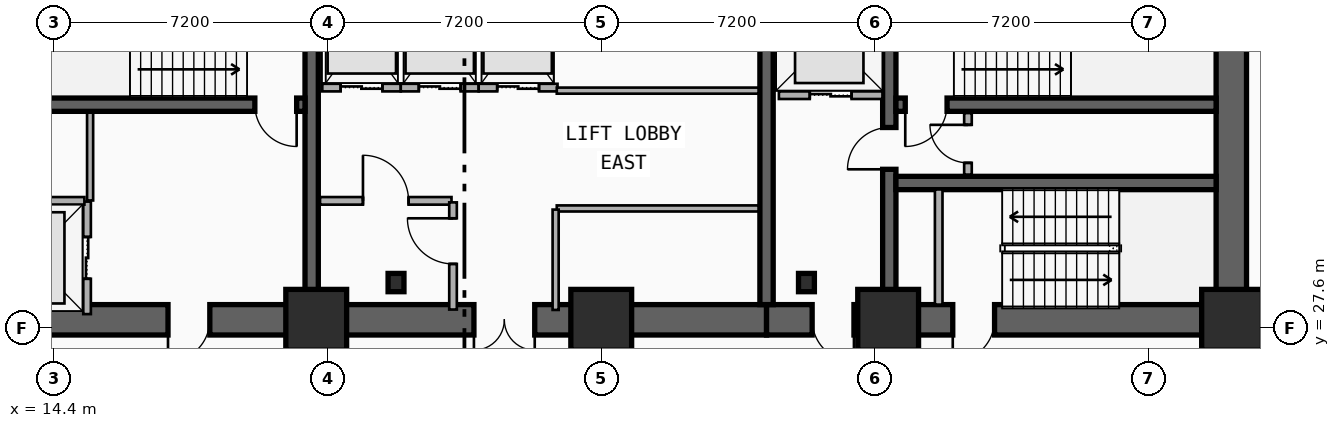
"""IFC4 building model, lengths in metres.
Left out: names, types, materials, properties, quantities, classifications, styles, units other than length and angle.
Written with IfcOpenShell. Run it as: python <this file> out.ifc"""

import sys

from ifc_helpers import new_model, si_unit, direction, frame, frame_2d, origin, origin_2d, place, context, subcontext, project, spatial, rectangle, i_section, extrude, element, fill, save


model = new_model("IFC4")
c1 = context("Model", 3, precision=1e-05, world=origin(), true_north=direction((0.0, 1.0)))
c2 = subcontext(c1, "Body", "Model", "MODEL_VIEW")
j1 = project(units=[si_unit("LENGTHUNIT", "METRE"), si_unit("PLANEANGLEUNIT", "RADIAN")], contexts=[c1])
p1 = place(None, origin())
s1 = spatial("IfcSite", under=j1, at=p1, CompositionType="ELEMENT")
p2 = place(p1, origin())
s2 = spatial("IfcBuilding", under=s1, at=p2, CompositionType="ELEMENT")
p3 = place(p2, frame((0.0, 0.0, -4.4)))
s3 = spatial("IfcBuildingStorey", under=s2, at=p3, CompositionType="ELEMENT", Elevation=-4.4)
p4 = place(p3, frame((21.18, 27.82, 0.0), z_axis=(0.0, 0.0, 1.0), x_axis=(-1.0, 0.0, 0.0)))
e1 = element("IfcWall", 1, at=p4, inside=s3, PredefinedType="SHEAR", context=c2, shape_type="SweptSolid", body=[
    extrude(rectangle(XDim=9.03, YDim=0.8, at=frame_2d((4.515, 0.0))), origin(), (0.0, 0.0, 1.0), 4.4),
])
p5 = place(p4, frame((2.68, 0.0, 0.0)))
e2 = element("IfcOpeningElement", 2, at=p5, cuts=e1, PredefinedType="OPENING", context=c2, shape_type="SweptSolid", body=[
    extrude(rectangle(XDim=1.1, YDim=2.15, at=frame_2d((0.55, 1.075))), frame((0.0, 0.41, 0.0), z_axis=(0.0, -1.0, 0.0), x_axis=(1.0, 0.0, 0.0)), (0.0, 0.0, 1.0), 0.82),
])
p6 = place(p3, frame((33.15, 27.82, 0.0), z_axis=(0.0, 0.0, 1.0), x_axis=(-1.0, 0.0, 0.0)))
e3 = element("IfcWall", 3, at=p6, inside=s3, PredefinedType="SHEAR", context=c2, shape_type="SweptSolid", body=[
    extrude(rectangle(XDim=11.97, YDim=0.8, at=frame_2d((5.985, 0.0))), origin(), (0.0, 0.0, 1.0), 4.4),
])
p7 = place(p6, frame((6.1, 0.0, 0.0)))
e4 = element("IfcOpeningElement", 4, at=p7, cuts=e3, PredefinedType="OPENING", context=c2, shape_type="SweptSolid", body=[
    extrude(rectangle(XDim=1.6, YDim=2.2, at=frame_2d((0.8, 1.1))), frame((0.0, 0.41, 0.0), z_axis=(0.0, -1.0, 0.0), x_axis=(1.0, 0.0, 0.0)), (0.0, 0.0, 1.0), 0.82),
])
p8 = place(p3, frame((45.38, 27.82, 0.0), z_axis=(0.0, 0.0, 1.0), x_axis=(-1.0, 0.0, 0.0)))
e5 = element("IfcWall", 5, at=p8, inside=s3, PredefinedType="SHEAR", context=c2, shape_type="SweptSolid", body=[
    extrude(rectangle(XDim=12.23, YDim=0.8, at=frame_2d((6.115, 0.0))), origin(), (0.0, 0.0, 1.0), 4.4),
])
p9 = place(p8, frame((9.93, 0.0, 0.0)))
e6 = element("IfcOpeningElement", 6, at=p9, cuts=e5, PredefinedType="OPENING", context=c2, shape_type="SweptSolid", body=[
    extrude(rectangle(XDim=1.1, YDim=2.15, at=frame_2d((0.55, 1.075))), frame((0.0, 0.41, 0.0), z_axis=(0.0, -1.0, 0.0), x_axis=(1.0, 0.0, 0.0)), (0.0, 0.0, 1.0), 0.82),
])
p10 = place(p8, frame((6.23, 0.0, 0.0)))
e7 = element("IfcOpeningElement", 7, at=p10, cuts=e5, PredefinedType="OPENING", context=c2, shape_type="SweptSolid", body=[
    extrude(rectangle(XDim=1.1, YDim=2.15, at=frame_2d((0.55, 1.075))), frame((0.0, 0.41, 0.0), z_axis=(0.0, -1.0, 0.0), x_axis=(1.0, 0.0, 0.0)), (0.0, 0.0, 1.0), 0.82),
])
p11 = place(p3, frame((45.38, 28.22, 0.0), z_axis=(0.0, 0.0, 1.0), x_axis=(0.0, 1.0, 0.0)))
e8 = element("IfcWall", 8, at=p11, inside=s3, PredefinedType="SHEAR", context=c2, shape_type="SweptSolid", body=[
    extrude(rectangle(XDim=8.43, YDim=0.8, at=frame_2d((4.215, 0.0))), origin(), (0.0, 0.0, 1.0), 4.4),
])
for number, where, z_axis, x_axis in (
    (9, (21.18, 28.22, 0.0), (0.0, 0.0, 1.0), (0.0, 1.0, 0.0)),
    (10, (33.15, 28.22, 0.0), (0.0, 0.0, 1.0), (0.0, 1.0, 0.0)),
):
    element("IfcWall", number, at=place(p3, frame(where, z_axis=z_axis, x_axis=x_axis)), inside=s3, PredefinedType="SHEAR", context=c2, shape_type="SweptSolid", body=[
        extrude(rectangle(XDim=8.43, YDim=0.35, at=frame_2d((4.215, 0.0))), origin(), (0.0, 0.0, 1.0), 4.4),
    ])
p12 = place(p3, frame((36.38, 28.22, 0.0), z_axis=(0.0, 0.0, 1.0), x_axis=(0.0, 1.0, 0.0)))
e11 = element("IfcWall", 11, at=p12, inside=s3, PredefinedType="SHEAR", context=c2, shape_type="SweptSolid", body=[
    extrude(rectangle(XDim=8.43, YDim=0.35, at=frame_2d((4.215, 0.0))), origin(), (0.0, 0.0, 1.0), 4.4),
])
p13 = place(p12, frame((3.56, 0.0, 0.0)))
e12 = element("IfcOpeningElement", 12, at=p13, cuts=e11, PredefinedType="OPENING", context=c2, shape_type="SweptSolid", body=[
    extrude(rectangle(XDim=1.1, YDim=2.15, at=frame_2d((0.55, 1.075))), frame((0.0, 0.185, 0.0), z_axis=(0.0, -1.0, 0.0), x_axis=(1.0, 0.0, 0.0)), (0.0, 0.0, 1.0), 0.37),
])
p14 = place(p3, frame((21.005, 33.48, 0.0), z_axis=(0.0, 0.0, 1.0), x_axis=(-1.0, 0.0, 0.0)))
e13 = element("IfcWall", 13, at=p14, inside=s3, PredefinedType="SHEAR", context=c2, shape_type="SweptSolid", body=[
    extrude(rectangle(XDim=8.455, YDim=0.35, at=frame_2d((4.228, 0.0))), origin(), (0.0, 0.0, 1.0), 4.4),
])
p15 = place(p14, frame((0.22, 0.0, 0.0)))
e14 = element("IfcOpeningElement", 14, at=p15, cuts=e13, PredefinedType="OPENING", context=c2, shape_type="SweptSolid", body=[
    extrude(rectangle(XDim=1.1, YDim=2.15, at=frame_2d((0.55, 1.075))), frame((0.0, 0.185, 0.0), z_axis=(0.0, -1.0, 0.0), x_axis=(1.0, 0.0, 0.0)), (0.0, 0.0, 1.0), 0.37),
])
p16 = place(p3, frame((44.98, 33.48, 0.0), z_axis=(0.0, 0.0, 1.0), x_axis=(-1.0, 0.0, 0.0)))
e15 = element("IfcWall", 15, at=p16, inside=s3, PredefinedType="SHEAR", context=c2, shape_type="SweptSolid", body=[
    extrude(rectangle(XDim=8.425, YDim=0.35, at=frame_2d((4.212, 0.0))), origin(), (0.0, 0.0, 1.0), 4.4),
])
p17 = place(p16, frame((7.08, 0.0, 0.0)))
e16 = element("IfcOpeningElement", 16, at=p17, cuts=e15, PredefinedType="OPENING", context=c2, shape_type="SweptSolid", body=[
    extrude(rectangle(XDim=1.1, YDim=2.15, at=frame_2d((0.55, 1.075))), frame((0.0, 0.185, 0.0), z_axis=(0.0, -1.0, 0.0), x_axis=(1.0, 0.0, 0.0)), (0.0, 0.0, 1.0), 0.37),
])
p18 = place(p3, frame((36.555, 31.42, 0.0), z_axis=(0.0, 0.0, 1.0), x_axis=(1.0, 0.0, 0.0)))
e17 = element("IfcWall", 17, at=p18, inside=s3, PredefinedType="SHEAR", context=c2, shape_type="SweptSolid", body=[
    extrude(rectangle(XDim=8.425, YDim=0.35, at=frame_2d((4.212, 0.0))), origin(), (0.0, 0.0, 1.0), 4.4),
])
for number, where, z_axis, x_axis in (
    (18, (23.4, 28.8, 0.0), (0.0, 0.0, 1.0), (1.0, 0.0, 0.0)),
    (19, (34.2, 28.8, 0.0), (0.0, 0.0, 1.0), (1.0, 0.0, 0.0)),
):
    element("IfcColumn", number, at=place(p3, frame(where, z_axis=z_axis, x_axis=x_axis)), inside=s3, PredefinedType="COLUMN", context=c2, shape_type="SweptSolid", body=[
        extrude(i_section(OverallWidth=0.418, OverallDepth=0.481, WebThickness=0.043, FlangeThickness=0.068, FilletRadius=0.015, at=origin_2d()), origin(), (0.0, 0.0, 1.0), 4.4),
    ])
for number, where, z_axis, x_axis in (
    (20, (21.3, 27.82, 0.0), (0.0, 0.0, 1.0), (1.0, 0.0, 0.0)),
    (21, (28.8, 27.82, 0.0), (0.0, 0.0, 1.0), (1.0, 0.0, 0.0)),
    (22, (36.35, 27.82, 0.0), (0.0, 0.0, 1.0), (1.0, 0.0, 0.0)),
    (23, (45.4, 27.82, 0.0), (0.0, 0.0, 1.0), (1.0, 0.0, 0.0)),
):
    element("IfcColumn", number, at=place(p3, frame(where, z_axis=z_axis, x_axis=x_axis)), inside=s3, PredefinedType="COLUMN", context=c2, shape_type="SweptSolid", body=[
        extrude(rectangle(XDim=1.6, YDim=1.6, at=origin_2d()), origin(), (0.0, 0.0, 1.0), 4.4),
    ])
p19 = place(p3, frame((15.27, 27.97, 0.0), z_axis=(0.0, 0.0, 1.0), x_axis=(0.0, 1.0, 0.0)))
e24 = element("IfcWall", 24, at=p19, inside=s3, PredefinedType="PARTITIONING", context=c2, shape_type="SweptSolid", body=[
    extrude(rectangle(XDim=2.96, YDim=0.2, at=frame_2d((1.48, 0.0))), origin(), (0.0, 0.0, 1.0), 3.022),
])
p20 = place(p19, frame((0.93, 0.0, 0.0)))
e25 = element("IfcOpeningElement", 25, at=p20, cuts=e24, PredefinedType="OPENING", context=c2, shape_type="SweptSolid", body=[
    extrude(rectangle(XDim=1.1, YDim=2.15, at=frame_2d((0.55, 1.075))), frame((0.0, 0.11, 0.0), z_axis=(0.0, -1.0, 0.0), x_axis=(1.0, 0.0, 0.0)), (0.0, 0.0, 1.0), 0.22),
])
p21 = place(p3, frame((12.45, 30.95, 0.0), z_axis=(0.0, 0.0, 1.0), x_axis=(1.0, 0.0, 0.0)))
e26 = element("IfcWall", 26, at=p21, inside=s3, PredefinedType="PARTITIONING", context=c2, shape_type="SweptSolid", body=[
    extrude(rectangle(XDim=2.75, YDim=0.2, at=frame_2d((1.375, 0.0))), origin(), (0.0, 0.0, 1.0), 3.022),
])
p22 = place(p3, frame((33.475, 33.73, 0.0), z_axis=(0.0, 0.0, 1.0), x_axis=(1.0, 0.0, 0.0)))
e27 = element("IfcWall", 27, at=p22, inside=s3, PredefinedType="PARTITIONING", context=c2, shape_type="SweptSolid", body=[
    extrude(rectangle(XDim=2.725, YDim=0.2, at=frame_2d((1.362, 0.0))), origin(), (0.0, 0.0, 1.0), 3.022),
])
p23 = place(p22, frame((0.812, 0.0, 0.0)))
e28 = element("IfcOpeningElement", 28, at=p23, cuts=e27, PredefinedType="OPENING", context=c2, shape_type="SweptSolid", body=[
    extrude(rectangle(XDim=1.1, YDim=2.15, at=frame_2d((0.55, 1.075))), frame((0.0, 0.11, 0.0), z_axis=(0.0, -1.0, 0.0), x_axis=(1.0, 0.0, 0.0)), (0.0, 0.0, 1.0), 0.22),
])
p24 = place(p3, frame((21.46, 33.93, 0.0), z_axis=(0.0, 0.0, 1.0), x_axis=(1.0, 0.0, 0.0)))
e29 = element("IfcWall", 29, at=p24, inside=s3, PredefinedType="PARTITIONING", context=c2, shape_type="SweptSolid", body=[
    extrude(rectangle(XDim=2.065, YDim=0.2, at=frame_2d((1.032, 0.0))), origin(), (0.0, 0.0, 1.0), 3.022),
])
p25 = place(p24, frame((0.482, 0.0, 0.0)))
e30 = element("IfcOpeningElement", 30, at=p25, cuts=e29, PredefinedType="OPENING", context=c2, shape_type="SweptSolid", body=[
    extrude(rectangle(XDim=1.1, YDim=2.15, at=frame_2d((0.55, 1.075))), frame((0.0, 0.11, 0.0), z_axis=(0.0, -1.0, 0.0), x_axis=(1.0, 0.0, 0.0)), (0.0, 0.0, 1.0), 0.22),
])
p26 = place(p3, frame((23.525, 33.93, 0.0), z_axis=(0.0, 0.0, 1.0), x_axis=(1.0, 0.0, 0.0)))
e31 = element("IfcWall", 31, at=p26, inside=s3, PredefinedType="PARTITIONING", context=c2, shape_type="SweptSolid", body=[
    extrude(rectangle(XDim=2.05, YDim=0.2, at=frame_2d((1.025, 0.0))), origin(), (0.0, 0.0, 1.0), 4.05),
])
p27 = place(p26, frame((0.475, 0.0, 0.0)))
e32 = element("IfcOpeningElement", 32, at=p27, cuts=e31, PredefinedType="OPENING", context=c2, shape_type="SweptSolid", body=[
    extrude(rectangle(XDim=1.1, YDim=2.15, at=frame_2d((0.55, 1.075))), frame((0.0, 0.11, 0.0), z_axis=(0.0, -1.0, 0.0), x_axis=(1.0, 0.0, 0.0)), (0.0, 0.0, 1.0), 0.22),
])
p28 = place(p3, frame((25.575, 33.93, 0.0), z_axis=(0.0, 0.0, 1.0), x_axis=(1.0, 0.0, 0.0)))
e33 = element("IfcWall", 33, at=p28, inside=s3, PredefinedType="PARTITIONING", context=c2, shape_type="SweptSolid", body=[
    extrude(rectangle(XDim=2.075, YDim=0.2, at=frame_2d((1.038, 0.0))), origin(), (0.0, 0.0, 1.0), 4.05),
])
p29 = place(p28, frame((0.488, 0.0, 0.0)))
e34 = element("IfcOpeningElement", 34, at=p29, cuts=e33, PredefinedType="OPENING", context=c2, shape_type="SweptSolid", body=[
    extrude(rectangle(XDim=1.1, YDim=2.15, at=frame_2d((0.55, 1.075))), frame((0.0, 0.11, 0.0), z_axis=(0.0, -1.0, 0.0), x_axis=(1.0, 0.0, 0.0)), (0.0, 0.0, 1.0), 0.22),
])
p30 = place(p3, frame((37.68, 28.22, 0.0), z_axis=(0.0, 0.0, 1.0), x_axis=(0.0, 1.0, 0.0)))
e35 = element("IfcWall", 35, at=p30, inside=s3, PredefinedType="PARTITIONING", context=c2, shape_type="SweptSolid", body=[
    extrude(rectangle(XDim=3.03, YDim=0.2, at=frame_2d((1.515, 0.0))), origin(), (0.0, 0.0, 1.0), 4.05),
])
p31 = place(p3, frame((38.45, 31.64, 0.0), z_axis=(0.0, 0.0, 1.0), x_axis=(0.0, 1.0, 0.0)))
e36 = element("IfcWall", 36, at=p31, inside=s3, PredefinedType="PARTITIONING", context=c2, shape_type="SweptSolid", body=[
    extrude(rectangle(XDim=1.62, YDim=0.2, at=frame_2d((0.81, 0.0))), origin(), (0.0, 0.0, 1.0), 4.05),
])
p32 = place(p31, frame((0.31, 0.0, 0.0)))
e37 = element("IfcOpeningElement", 37, at=p32, cuts=e36, PredefinedType="OPENING", context=c2, shape_type="SweptSolid", body=[
    extrude(rectangle(XDim=1.0, YDim=2.15, at=frame_2d((0.5, 1.075))), frame((0.0, 0.11, 0.0), z_axis=(0.0, -1.0, 0.0), x_axis=(1.0, 0.0, 0.0)), (0.0, 0.0, 1.0), 0.22),
])
p33 = place(p3, frame((21.4, 30.95, 0.0), z_axis=(0.0, 0.0, 1.0), x_axis=(1.0, 0.0, 0.0)))
e38 = element("IfcWall", 38, at=p33, inside=s3, PredefinedType="PARTITIONING", context=c2, shape_type="SweptSolid", body=[
    extrude(rectangle(XDim=3.46, YDim=0.2, at=frame_2d((1.73, 0.0))), origin(), (0.0, 0.0, 1.0), 3.022),
])
p34 = place(p33, frame((1.13, 0.0, 0.0)))
e39 = element("IfcOpeningElement", 39, at=p34, cuts=e38, PredefinedType="OPENING", context=c2, shape_type="SweptSolid", body=[
    extrude(rectangle(XDim=1.2, YDim=2.15, at=frame_2d((0.6, 1.075))), frame((0.0, 0.11, 0.0), z_axis=(0.0, -1.0, 0.0), x_axis=(1.0, 0.0, 0.0)), (0.0, 0.0, 1.0), 0.22),
])
p35 = place(p3, frame((24.9, 28.09, 0.0), z_axis=(0.0, 0.0, 1.0), x_axis=(0.0, 1.0, 0.0)))
e40 = element("IfcWall", 40, at=p35, inside=s3, PredefinedType="PARTITIONING", context=c2, shape_type="SweptSolid", body=[
    extrude(rectangle(XDim=2.82, YDim=0.2, at=frame_2d((1.41, 0.0))), origin(), (0.0, 0.0, 1.0), 4.05),
])
p36 = place(p35, frame((1.201, 0.0, 0.0)))
e41 = element("IfcOpeningElement", 41, at=p36, cuts=e40, PredefinedType="OPENING", context=c2, shape_type="SweptSolid", body=[
    extrude(rectangle(XDim=1.2, YDim=2.15, at=frame_2d((0.6, 1.075))), frame((0.0, 0.11, 0.0), z_axis=(0.0, -1.0, 0.0), x_axis=(1.0, 0.0, 0.0)), (0.0, 0.0, 1.0), 0.22),
])
p37 = place(p3, frame((15.35, 30.96, 0.0), z_axis=(0.0, 0.0, 1.0), x_axis=(0.0, 1.0, 0.0)))
e42 = element("IfcWall", 42, at=p37, inside=s3, PredefinedType="PARTITIONING", context=c2, shape_type="SweptSolid", body=[
    extrude(rectangle(XDim=2.31, YDim=0.16, at=frame_2d((1.155, 0.0))), origin(), (0.0, 0.0, 1.0), 4.05),
])
for number, where, z_axis, x_axis in (
    (43, (27.63, 30.75, 0.0), (0.0, 0.0, 1.0), (1.0, 0.0, 0.0)),
    (44, (27.63, 33.85, 0.0), (0.0, 0.0, 1.0), (1.0, 0.0, 0.0)),
):
    element("IfcWall", number, at=place(p3, frame(where, z_axis=z_axis, x_axis=x_axis)), inside=s3, PredefinedType="PARTITIONING", context=c2, shape_type="SweptSolid", body=[
        extrude(rectangle(XDim=5.31, YDim=0.16, at=frame_2d((2.655, 0.0))), origin(), (0.0, 0.0, 1.0), 3.022),
    ])
p38 = place(p3, frame((27.6, 28.08, 0.0), z_axis=(0.0, 0.0, 1.0), x_axis=(0.0, 1.0, 0.0)))
e45 = element("IfcWall", 45, at=p38, inside=s3, PredefinedType="PARTITIONING", context=c2, shape_type="SweptSolid", body=[
    extrude(rectangle(XDim=2.64, YDim=0.16, at=frame_2d((1.32, 0.0))), origin(), (0.0, 0.0, 1.0), 4.05),
])
p39 = place(p3, frame((45.41, 27.6, 0.0), z_axis=(0.0, 0.0, 1.0), x_axis=(1.0, 0.0, 0.0)))
e46 = element("IfcWall", 46, at=p39, inside=s3, PredefinedType="PARTITIONING", context=c2, shape_type="SweptSolid", body=[
    extrude(rectangle(XDim=0.91, YDim=0.16, at=frame_2d((0.455, 0.0))), origin(), (0.0, 0.0, 1.0), 3.022),
])
p40 = place(p20, origin())
e47 = element("IfcDoor", 47, at=p40, inside=s3, OperationType="DOUBLE_DOOR_SLIDING", PredefinedType="DOOR", context=c2, shape_type="SweptSolid", body=[
    extrude(rectangle(XDim=1.1, YDim=2.15, at=frame_2d((0.55, 1.075))), frame((0.0, 0.025, 0.0), z_axis=(0.0, -1.0, 0.0), x_axis=(1.0, 0.0, 0.0)), (0.0, 0.0, 1.0), 0.05),
])
fill(e25, e47)
p41 = place(p23, origin())
e48 = element("IfcDoor", 48, at=p41, inside=s3, OperationType="DOUBLE_DOOR_SLIDING", PredefinedType="DOOR", context=c2, shape_type="SweptSolid", body=[
    extrude(rectangle(XDim=1.1, YDim=2.15, at=frame_2d((0.55, 1.075))), frame((0.0, 0.025, 0.0), z_axis=(0.0, -1.0, 0.0), x_axis=(1.0, 0.0, 0.0)), (0.0, 0.0, 1.0), 0.05),
])
fill(e28, e48)
p42 = place(p25, origin())
e49 = element("IfcDoor", 49, at=p42, inside=s3, OperationType="DOUBLE_DOOR_SLIDING", PredefinedType="DOOR", context=c2, shape_type="SweptSolid", body=[
    extrude(rectangle(XDim=1.1, YDim=2.15, at=frame_2d((0.55, 1.075))), frame((0.0, 0.025, 0.0), z_axis=(0.0, -1.0, 0.0), x_axis=(1.0, 0.0, 0.0)), (0.0, 0.0, 1.0), 0.05),
])
fill(e30, e49)
p43 = place(p27, origin())
e50 = element("IfcDoor", 50, at=p43, inside=s3, OperationType="DOUBLE_DOOR_SLIDING", PredefinedType="DOOR", context=c2, shape_type="SweptSolid", body=[
    extrude(rectangle(XDim=1.1, YDim=2.15, at=frame_2d((0.55, 1.075))), frame((0.0, 0.025, 0.0), z_axis=(0.0, -1.0, 0.0), x_axis=(1.0, 0.0, 0.0)), (0.0, 0.0, 1.0), 0.05),
])
fill(e32, e50)
p44 = place(p29, origin())
e51 = element("IfcDoor", 51, at=p44, inside=s3, OperationType="DOUBLE_DOOR_SLIDING", PredefinedType="DOOR", context=c2, shape_type="SweptSolid", body=[
    extrude(rectangle(XDim=1.1, YDim=2.15, at=frame_2d((0.55, 1.075))), frame((0.0, 0.025, 0.0), z_axis=(0.0, -1.0, 0.0), x_axis=(1.0, 0.0, 0.0)), (0.0, 0.0, 1.0), 0.05),
])
fill(e34, e51)
p45 = place(p15, origin())
e52 = element("IfcDoor", 52, at=p45, inside=s3, OperationType="SINGLE_SWING_LEFT", PredefinedType="DOOR", context=c2, shape_type="SweptSolid", body=[
    extrude(rectangle(XDim=1.1, YDim=2.15, at=frame_2d((0.55, 1.075))), frame((0.0, 0.025, 0.0), z_axis=(0.0, -1.0, 0.0), x_axis=(1.0, 0.0, 0.0)), (0.0, 0.0, 1.0), 0.05),
])
fill(e14, e52)
p46 = place(p5, origin())
e53 = element("IfcDoor", 53, at=p46, inside=s3, OperationType="SINGLE_SWING_RIGHT", PredefinedType="DOOR", context=c2, shape_type="SweptSolid", body=[
    extrude(rectangle(XDim=1.1, YDim=2.15, at=frame_2d((0.55, 1.075))), frame((0.0, 0.025, 0.0), z_axis=(0.0, -1.0, 0.0), x_axis=(1.0, 0.0, 0.0)), (0.0, 0.0, 1.0), 0.05),
])
fill(e2, e53)
p47 = place(p17, origin())
e54 = element("IfcDoor", 54, at=p47, inside=s3, OperationType="SINGLE_SWING_RIGHT", PredefinedType="DOOR", context=c2, shape_type="SweptSolid", body=[
    extrude(rectangle(XDim=1.1, YDim=2.15, at=frame_2d((0.55, 1.075))), frame((0.0, 0.025, 0.0), z_axis=(0.0, -1.0, 0.0), x_axis=(1.0, 0.0, 0.0)), (0.0, 0.0, 1.0), 0.05),
])
fill(e16, e54)
p48 = place(p13, origin())
e55 = element("IfcDoor", 55, at=p48, inside=s3, OperationType="SINGLE_SWING_LEFT", PredefinedType="DOOR", context=c2, shape_type="SweptSolid", body=[
    extrude(rectangle(XDim=1.1, YDim=2.15, at=frame_2d((0.55, 1.075))), frame((0.0, 0.025, 0.0), z_axis=(0.0, -1.0, 0.0), x_axis=(1.0, 0.0, 0.0)), (0.0, 0.0, 1.0), 0.05),
])
fill(e12, e55)
p49 = place(p9, origin())
e56 = element("IfcDoor", 56, at=p49, inside=s3, OperationType="SINGLE_SWING_LEFT", PredefinedType="DOOR", context=c2, shape_type="SweptSolid", body=[
    extrude(rectangle(XDim=1.1, YDim=2.15, at=frame_2d((0.55, 1.075))), frame((0.0, 0.025, 0.0), z_axis=(0.0, -1.0, 0.0), x_axis=(1.0, 0.0, 0.0)), (0.0, 0.0, 1.0), 0.05),
])
fill(e6, e56)
p50 = place(p10, origin())
e57 = element("IfcDoor", 57, at=p50, inside=s3, OperationType="SINGLE_SWING_RIGHT", PredefinedType="DOOR", context=c2, shape_type="SweptSolid", body=[
    extrude(rectangle(XDim=1.1, YDim=2.15, at=frame_2d((0.55, 1.075))), frame((0.0, 0.025, 0.0), z_axis=(0.0, -1.0, 0.0), x_axis=(1.0, 0.0, 0.0)), (0.0, 0.0, 1.0), 0.05),
])
fill(e7, e57)
p51 = place(p7, origin())
e58 = element("IfcDoor", 58, at=p51, inside=s3, OperationType="SINGLE_SWING_LEFT", PredefinedType="DOOR", context=c2, shape_type="SweptSolid", body=[
    extrude(rectangle(XDim=1.6, YDim=2.2, at=frame_2d((0.8, 1.1))), frame((0.0, 0.025, 0.0), z_axis=(0.0, -1.0, 0.0), x_axis=(1.0, 0.0, 0.0)), (0.0, 0.0, 1.0), 0.05),
])
fill(e4, e58)
p52 = place(p32, origin())
e59 = element("IfcDoor", 59, at=p52, inside=s3, OperationType="SINGLE_SWING_RIGHT", PredefinedType="DOOR", context=c2, shape_type="SweptSolid", body=[
    extrude(rectangle(XDim=1.0, YDim=2.15, at=frame_2d((0.5, 1.075))), frame((0.0, 0.025, 0.0), z_axis=(0.0, -1.0, 0.0), x_axis=(1.0, 0.0, 0.0)), (0.0, 0.0, 1.0), 0.05),
])
fill(e37, e59)
p53 = place(p34, origin())
e60 = element("IfcDoor", 60, at=p53, inside=s3, OperationType="SINGLE_SWING_LEFT", PredefinedType="DOOR", context=c2, shape_type="SweptSolid", body=[
    extrude(rectangle(XDim=1.2, YDim=2.15, at=frame_2d((0.6, 1.075))), frame((0.0, 0.025, 0.0), z_axis=(0.0, -1.0, 0.0), x_axis=(1.0, 0.0, 0.0)), (0.0, 0.0, 1.0), 0.05),
])
fill(e39, e60)
p54 = place(p36, origin())
e61 = element("IfcDoor", 61, at=p54, inside=s3, OperationType="SINGLE_SWING_RIGHT", PredefinedType="DOOR", context=c2, shape_type="SweptSolid", body=[
    extrude(rectangle(XDim=1.2, YDim=2.15, at=frame_2d((0.6, 1.075))), frame((0.0, 0.025, 0.0), z_axis=(0.0, -1.0, 0.0), x_axis=(1.0, 0.0, 0.0)), (0.0, 0.0, 1.0), 0.05),
])
fill(e41, e61)
save(model, sys.argv[1])
